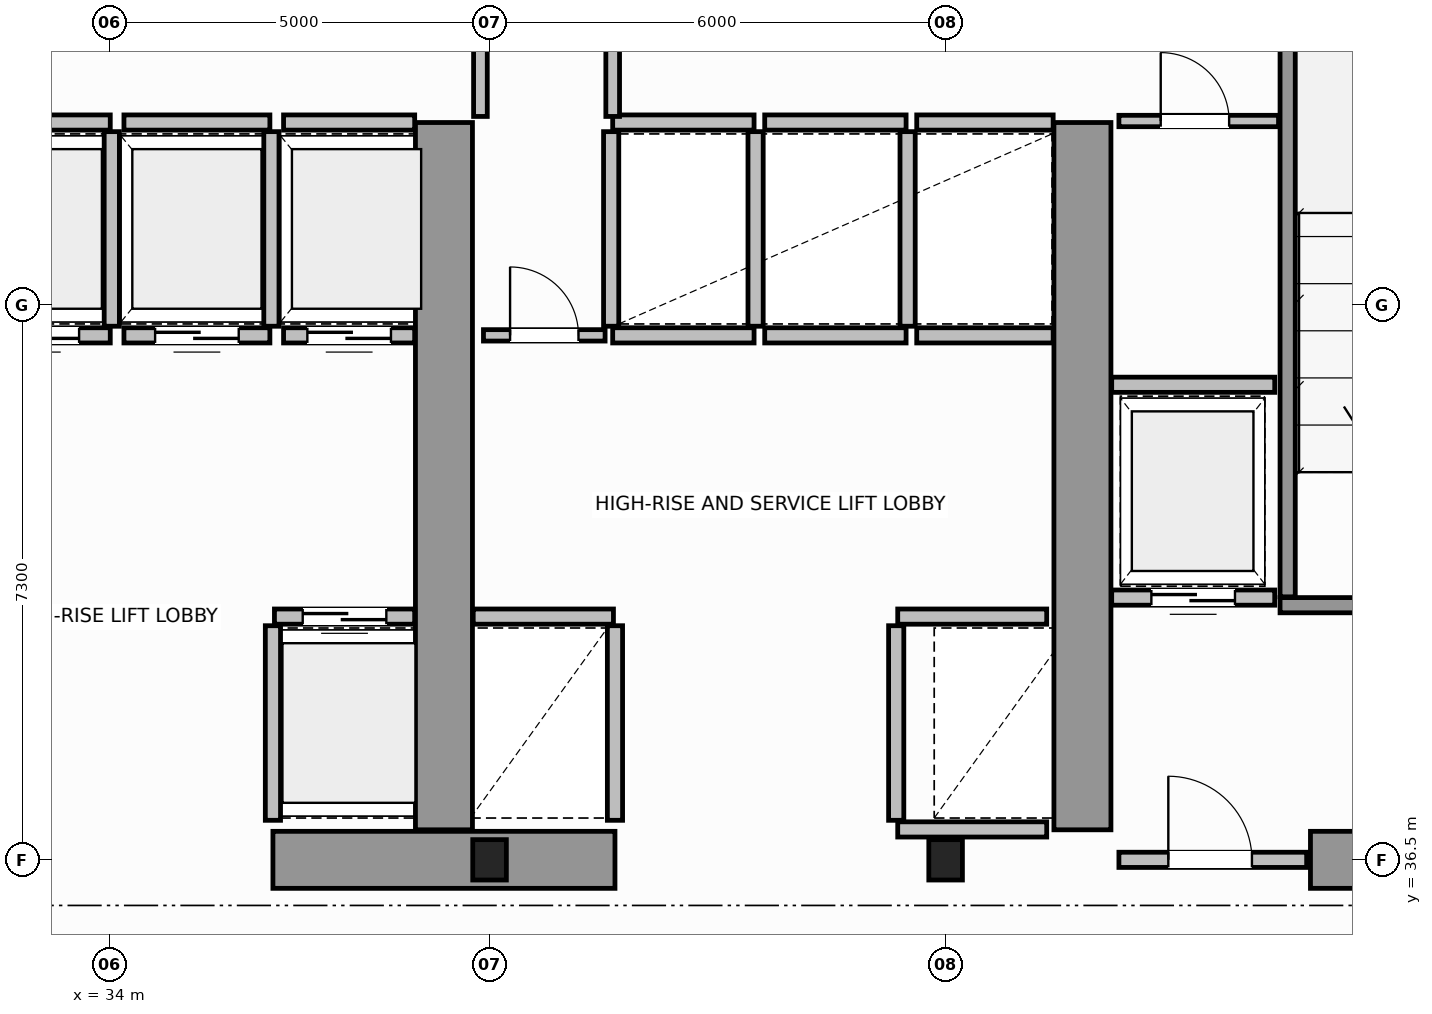
"""IFC4 building model, lengths in metres.
Left out: names, types, materials, properties, quantities, classifications, styles, units other than length and angle.
Written with IfcOpenShell. Run it as: python <this file> out.ifc"""

import sys

from ifc_helpers import new_model, si_unit, direction, frame, frame_2d, origin, origin_2d, place, context, subcontext, project, spatial, rectangle, i_section, extrude, source, transform, mapped, element, fill, save


model = new_model("IFC4")
c1 = context("Model", 3, precision=1e-05, world=origin(), true_north=direction((0.0, 1.0)))
c2 = subcontext(c1, "Body", "Model", "MODEL_VIEW")
j1 = project(units=[si_unit("LENGTHUNIT", "METRE"), si_unit("PLANEANGLEUNIT", "RADIAN")], contexts=[c1])
p1 = place(None, origin())
s1 = spatial("IfcSite", under=j1, at=p1, CompositionType="ELEMENT")
p2 = place(p1, origin())
s2 = spatial("IfcBuilding", under=s1, at=p2, CompositionType="ELEMENT")
p3 = place(p2, frame((0.0, 0.0, 107.2)))
s3 = spatial("IfcBuildingStorey", under=s2, at=p3, CompositionType="ELEMENT", Elevation=107.2)
m1 = source(origin(), c2, "Body", "SweptSolid", [
    extrude(i_section(OverallWidth=0.442, OverallDepth=0.531, WebThickness=0.065, FlangeThickness=0.076, FilletRadius=0.015, at=origin_2d()), origin(), (0.0, 0.0, 1.0), 3.8),
])
for number, where, z_axis, x_axis in (
    (1, (39.0, 36.5, 0.0), (0.0, 0.0, 1.0), (1.0, 0.0, 0.0)),
    (2, (45.0, 36.5, 0.0), (0.0, 0.0, 1.0), (1.0, 0.0, 0.0)),
):
    element("IfcColumn", number, at=place(p3, frame(where, z_axis=z_axis, x_axis=x_axis)), inside=s3, PredefinedType="COLUMN", context=c2, shape_type="MappedRepresentation", body=[
        mapped(m1, transform((0.0, 0.0, 0.0), scale=1.0)),
    ])
p4 = place(p3, frame((36.15, 36.5, 0.0), z_axis=(0.0, 0.0, 1.0), x_axis=(1.0, 0.0, 0.0)))
e3 = element("IfcWall", 3, at=p4, inside=s3, PredefinedType="SHEAR", context=c2, shape_type="SweptSolid", body=[
    extrude(rectangle(XDim=4.5, YDim=0.75, at=frame_2d((2.25, 0.0))), origin(), (0.0, 0.0, 1.0), 3.8),
])
p5 = place(p3, frame((49.8, 36.5, 0.0), z_axis=(0.0, 0.0, 1.0), x_axis=(1.0, 0.0, 0.0)))
e4 = element("IfcWall", 4, at=p5, inside=s3, PredefinedType="SHEAR", context=c2, shape_type="SweptSolid", body=[
    extrude(rectangle(XDim=3.805, YDim=0.75, at=frame_2d((1.902, 0.0))), origin(), (0.0, 0.0, 1.0), 2.38),
])
for number, where, z_axis, x_axis in (
    (5, (38.4, 36.895, 0.0), (0.0, 0.0, 1.0), (0.0, 1.0, 0.0)),
    (6, (46.8, 36.895, 0.0), (0.0, 0.0, 1.0), (0.0, 1.0, 0.0)),
):
    element("IfcWall", number, at=place(p3, frame(where, z_axis=z_axis, x_axis=x_axis)), inside=s3, PredefinedType="SHEAR", context=c2, shape_type="SweptSolid", body=[
        extrude(rectangle(XDim=9.305, YDim=0.75, at=frame_2d((4.652, 0.0))), origin(), (0.0, 0.0, 1.0), 3.8),
    ])
p6 = place(p3, frame((49.4, 39.85, 0.0), z_axis=(0.0, 0.0, 1.0), x_axis=(1.0, 0.0, 0.0)))
e7 = element("IfcWall", 7, at=p6, inside=s3, PredefinedType="SOLIDWALL", context=c2, shape_type="SweptSolid", body=[
    extrude(rectangle(XDim=4.225, YDim=0.2, at=frame_2d((2.113, 0.0))), origin(), (0.0, 0.0, 1.0), 3.8),
])
p7 = place(p6, frame((1.325, 0.0, 0.0)))
e8 = element("IfcOpeningElement", 8, at=p7, cuts=e7, PredefinedType="OPENING", context=c2, shape_type="SweptSolid", body=[
    extrude(rectangle(XDim=1.1, YDim=2.15, at=frame_2d((0.55, 1.075))), frame((0.0, 0.11, 0.0), z_axis=(0.0, -1.0, 0.0), x_axis=(1.0, 0.0, 0.0)), (0.0, 0.0, 1.0), 0.22),
])
p8 = place(p3, frame((49.5, 39.96, 0.0), z_axis=(0.0, 0.0, 1.0), x_axis=(0.0, 1.0, 0.0)))
e9 = element("IfcWall", 9, at=p8, inside=s3, PredefinedType="SOLIDWALL", context=c2, shape_type="SweptSolid", body=[
    extrude(rectangle(XDim=9.93, YDim=0.2, at=frame_2d((4.965, 0.0))), origin(), (0.0, 0.0, 1.0), 3.8),
])
p9 = place(p3, frame((47.28, 36.5, 0.0), z_axis=(0.0, 0.0, 1.0), x_axis=(1.0, 0.0, 0.0)))
e10 = element("IfcWall", 10, at=p9, inside=s3, PredefinedType="SOLIDWALL", context=c2, shape_type="SweptSolid", body=[
    extrude(rectangle(XDim=2.47, YDim=0.2, at=frame_2d((1.235, 0.0))), origin(), (0.0, 0.0, 1.0), 2.37),
])
p10 = place(p9, frame((0.65, 0.0, 0.0)))
e11 = element("IfcOpeningElement", 11, at=p10, cuts=e10, PredefinedType="OPENING", context=c2, shape_type="SweptSolid", body=[
    extrude(rectangle(XDim=1.1, YDim=2.15, at=frame_2d((0.55, 1.075))), frame((0.0, 0.11, 0.0), z_axis=(0.0, -1.0, 0.0), x_axis=(1.0, 0.0, 0.0)), (0.0, 0.0, 1.0), 0.22),
])
p11 = place(p3, frame((36.17, 39.7, 0.0), z_axis=(0.0, 0.0, 1.0), x_axis=(1.0, 0.0, 0.0)))
e12 = element("IfcWall", 12, at=p11, inside=s3, PredefinedType="SOLIDWALL", context=c2, shape_type="SweptSolid", body=[
    extrude(rectangle(XDim=1.845, YDim=0.2, at=frame_2d((0.922, 0.0))), origin(), (0.0, 0.0, 1.0), 3.58),
])
p12 = place(p11, frame((0.372, 0.0, 0.0)))
e13 = element("IfcOpeningElement", 13, at=p12, cuts=e12, PredefinedType="OPENING", context=c2, shape_type="SweptSolid", body=[
    extrude(rectangle(XDim=1.1, YDim=2.15, at=frame_2d((0.55, 1.075))), frame((0.0, 0.11, 0.0), z_axis=(0.0, -1.0, 0.0), x_axis=(1.0, 0.0, 0.0)), (0.0, 0.0, 1.0), 0.22),
])
p13 = place(p3, frame((36.15, 37.02, 0.0), z_axis=(0.0, 0.0, 1.0), x_axis=(0.0, 1.0, 0.0)))
e14 = element("IfcWall", 14, at=p13, inside=s3, PredefinedType="SOLIDWALL", context=c2, shape_type="SweptSolid", body=[
    extrude(rectangle(XDim=2.56, YDim=0.2, at=frame_2d((1.28, 0.0))), origin(), (0.0, 0.0, 1.0), 3.58),
])
p14 = place(p3, frame((32.09, 43.4, 0.0), z_axis=(0.0, 0.0, 1.0), x_axis=(1.0, 0.0, 0.0)))
e15 = element("IfcWall", 15, at=p14, inside=s3, PredefinedType="SOLIDWALL", context=c2, shape_type="SweptSolid", body=[
    extrude(rectangle(XDim=1.92, YDim=0.2, at=frame_2d((0.96, 0.0))), origin(), (0.0, 0.0, 1.0), 3.58),
])
p15 = place(p14, frame((0.41, 0.0, 0.0)))
e16 = element("IfcOpeningElement", 16, at=p15, cuts=e15, PredefinedType="OPENING", context=c2, shape_type="SweptSolid", body=[
    extrude(rectangle(XDim=1.1, YDim=2.15, at=frame_2d((0.55, 1.075))), frame((0.0, 0.11, 0.0), z_axis=(0.0, -1.0, 0.0), x_axis=(1.0, 0.0, 0.0)), (0.0, 0.0, 1.0), 0.22),
])
p16 = place(p3, frame((32.09, 46.2, 0.0), z_axis=(0.0, 0.0, 1.0), x_axis=(1.0, 0.0, 0.0)))
e17 = element("IfcWall", 17, at=p16, inside=s3, PredefinedType="SOLIDWALL", context=c2, shape_type="SweptSolid", body=[
    extrude(rectangle(XDim=1.92, YDim=0.2, at=frame_2d((0.96, 0.0))), origin(), (0.0, 0.0, 1.0), 3.58),
])
p17 = place(p3, frame((34.03, 43.52, 0.0), z_axis=(0.0, 0.0, 1.0), x_axis=(0.0, 1.0, 0.0)))
e18 = element("IfcWall", 18, at=p17, inside=s3, PredefinedType="SOLIDWALL", context=c2, shape_type="SweptSolid", body=[
    extrude(rectangle(XDim=2.56, YDim=0.2, at=frame_2d((1.28, 0.0))), origin(), (0.0, 0.0, 1.0), 3.58),
])
p18 = place(p3, frame((34.19, 43.4, 0.0), z_axis=(0.0, 0.0, 1.0), x_axis=(1.0, 0.0, 0.0)))
e19 = element("IfcWall", 19, at=p18, inside=s3, PredefinedType="SOLIDWALL", context=c2, shape_type="SweptSolid", body=[
    extrude(rectangle(XDim=1.92, YDim=0.2, at=frame_2d((0.96, 0.0))), origin(), (0.0, 0.0, 1.0), 3.58),
])
p19 = place(p18, frame((0.41, 0.0, 0.0)))
e20 = element("IfcOpeningElement", 20, at=p19, cuts=e19, PredefinedType="OPENING", context=c2, shape_type="SweptSolid", body=[
    extrude(rectangle(XDim=1.1, YDim=2.15, at=frame_2d((0.55, 1.075))), frame((0.0, 0.11, 0.0), z_axis=(0.0, -1.0, 0.0), x_axis=(1.0, 0.0, 0.0)), (0.0, 0.0, 1.0), 0.22),
])
p20 = place(p3, frame((34.19, 46.2, 0.0), z_axis=(0.0, 0.0, 1.0), x_axis=(1.0, 0.0, 0.0)))
e21 = element("IfcWall", 21, at=p20, inside=s3, PredefinedType="SOLIDWALL", context=c2, shape_type="SweptSolid", body=[
    extrude(rectangle(XDim=1.92, YDim=0.2, at=frame_2d((0.96, 0.0))), origin(), (0.0, 0.0, 1.0), 3.58),
])
p21 = place(p3, frame((36.13, 43.52, 0.0), z_axis=(0.0, 0.0, 1.0), x_axis=(0.0, 1.0, 0.0)))
e22 = element("IfcWall", 22, at=p21, inside=s3, PredefinedType="SOLIDWALL", context=c2, shape_type="SweptSolid", body=[
    extrude(rectangle(XDim=2.56, YDim=0.2, at=frame_2d((1.28, 0.0))), origin(), (0.0, 0.0, 1.0), 3.58),
])
p22 = place(p3, frame((36.29, 43.4, 0.0), z_axis=(0.0, 0.0, 1.0), x_axis=(1.0, 0.0, 0.0)))
e23 = element("IfcWall", 23, at=p22, inside=s3, PredefinedType="SOLIDWALL", context=c2, shape_type="SweptSolid", body=[
    extrude(rectangle(XDim=1.725, YDim=0.2, at=frame_2d((0.862, 0.0))), origin(), (0.0, 0.0, 1.0), 3.58),
])
p23 = place(p22, frame((0.313, 0.0, 0.0)))
e24 = element("IfcOpeningElement", 24, at=p23, cuts=e23, PredefinedType="OPENING", context=c2, shape_type="SweptSolid", body=[
    extrude(rectangle(XDim=1.1, YDim=2.15, at=frame_2d((0.55, 1.075))), frame((0.0, 0.11, 0.0), z_axis=(0.0, -1.0, 0.0), x_axis=(1.0, 0.0, 0.0)), (0.0, 0.0, 1.0), 0.22),
])
p24 = place(p3, frame((36.29, 46.2, 0.0), z_axis=(0.0, 0.0, 1.0), x_axis=(1.0, 0.0, 0.0)))
e25 = element("IfcWall", 25, at=p24, inside=s3, PredefinedType="SOLIDWALL", context=c2, shape_type="SweptSolid", body=[
    extrude(rectangle(XDim=1.725, YDim=0.2, at=frame_2d((0.862, 0.0))), origin(), (0.0, 0.0, 1.0), 3.58),
])
p25 = place(p3, frame((38.785, 39.7, 0.0), z_axis=(0.0, 0.0, 1.0), x_axis=(1.0, 0.0, 0.0)))
e26 = element("IfcWall", 26, at=p25, inside=s3, PredefinedType="SOLIDWALL", context=c2, shape_type="SweptSolid", body=[
    extrude(rectangle(XDim=1.845, YDim=0.2, at=frame_2d((0.922, 0.0))), origin(), (0.0, 0.0, 1.0), 3.58),
])
p26 = place(p3, frame((40.65, 37.02, 0.0), z_axis=(0.0, 0.0, 1.0), x_axis=(0.0, 1.0, 0.0)))
e27 = element("IfcWall", 27, at=p26, inside=s3, PredefinedType="SOLIDWALL", context=c2, shape_type="SweptSolid", body=[
    extrude(rectangle(XDim=2.56, YDim=0.2, at=frame_2d((1.28, 0.0))), origin(), (0.0, 0.0, 1.0), 3.58),
])
p27 = place(p3, frame((44.37, 39.7, 0.0), z_axis=(0.0, 0.0, 1.0), x_axis=(1.0, 0.0, 0.0)))
e28 = element("IfcWall", 28, at=p27, inside=s3, PredefinedType="SOLIDWALL", context=c2, shape_type="SweptSolid", body=[
    extrude(rectangle(XDim=1.96, YDim=0.2, at=frame_2d((0.98, 0.0))), origin(), (0.0, 0.0, 1.0), 3.58),
])
p28 = place(p3, frame((44.37, 36.9, 0.0), z_axis=(0.0, 0.0, 1.0), x_axis=(1.0, 0.0, 0.0)))
e29 = element("IfcWall", 29, at=p28, inside=s3, PredefinedType="SOLIDWALL", context=c2, shape_type="SweptSolid", body=[
    extrude(rectangle(XDim=1.96, YDim=0.2, at=frame_2d((0.98, 0.0))), origin(), (0.0, 0.0, 1.0), 2.37),
])
p29 = place(p3, frame((44.35, 37.02, 0.0), z_axis=(0.0, 0.0, 1.0), x_axis=(0.0, 1.0, 0.0)))
e30 = element("IfcWall", 30, at=p29, inside=s3, PredefinedType="SOLIDWALL", context=c2, shape_type="SweptSolid", body=[
    extrude(rectangle(XDim=2.56, YDim=0.2, at=frame_2d((1.28, 0.0))), origin(), (0.0, 0.0, 1.0), 3.58),
])
for number, where, z_axis, x_axis in (
    (31, (40.62, 43.4, 0.0), (0.0, 0.0, 1.0), (1.0, 0.0, 0.0)),
    (32, (40.62, 46.2, 0.0), (0.0, 0.0, 1.0), (1.0, 0.0, 0.0)),
):
    element("IfcWall", number, at=place(p3, frame(where, z_axis=z_axis, x_axis=x_axis)), inside=s3, PredefinedType="SOLIDWALL", context=c2, shape_type="SweptSolid", body=[
        extrude(rectangle(XDim=1.86, YDim=0.2, at=frame_2d((0.93, 0.0))), origin(), (0.0, 0.0, 1.0), 3.58),
    ])
for number, where, z_axis, x_axis in (
    (33, (40.6, 43.52, 0.0), (0.0, 0.0, 1.0), (0.0, 1.0, 0.0)),
    (34, (42.5, 43.52, 0.0), (0.0, 0.0, 1.0), (0.0, 1.0, 0.0)),
):
    element("IfcWall", number, at=place(p3, frame(where, z_axis=z_axis, x_axis=x_axis)), inside=s3, PredefinedType="SOLIDWALL", context=c2, shape_type="SweptSolid", body=[
        extrude(rectangle(XDim=2.56, YDim=0.2, at=frame_2d((1.28, 0.0))), origin(), (0.0, 0.0, 1.0), 3.58),
    ])
for number, where, z_axis, x_axis in (
    (35, (42.62, 43.4, 0.0), (0.0, 0.0, 1.0), (1.0, 0.0, 0.0)),
    (36, (42.62, 46.2, 0.0), (0.0, 0.0, 1.0), (1.0, 0.0, 0.0)),
):
    element("IfcWall", number, at=place(p3, frame(where, z_axis=z_axis, x_axis=x_axis)), inside=s3, PredefinedType="SOLIDWALL", context=c2, shape_type="SweptSolid", body=[
        extrude(rectangle(XDim=1.86, YDim=0.2, at=frame_2d((0.93, 0.0))), origin(), (0.0, 0.0, 1.0), 3.58),
    ])
p30 = place(p3, frame((44.5, 43.52, 0.0), z_axis=(0.0, 0.0, 1.0), x_axis=(0.0, 1.0, 0.0)))
e37 = element("IfcWall", 37, at=p30, inside=s3, PredefinedType="SOLIDWALL", context=c2, shape_type="SweptSolid", body=[
    extrude(rectangle(XDim=2.56, YDim=0.2, at=frame_2d((1.28, 0.0))), origin(), (0.0, 0.0, 1.0), 3.58),
])
for number, where, z_axis, x_axis in (
    (38, (44.62, 43.4, 0.0), (0.0, 0.0, 1.0), (1.0, 0.0, 0.0)),
    (39, (44.62, 46.2, 0.0), (0.0, 0.0, 1.0), (1.0, 0.0, 0.0)),
):
    element("IfcWall", number, at=place(p3, frame(where, z_axis=z_axis, x_axis=x_axis)), inside=s3, PredefinedType="SOLIDWALL", context=c2, shape_type="SweptSolid", body=[
        extrude(rectangle(XDim=1.795, YDim=0.2, at=frame_2d((0.897, 0.0))), origin(), (0.0, 0.0, 1.0), 3.58),
    ])
p31 = place(p3, frame((47.185, 39.95, 0.0), z_axis=(0.0, 0.0, 1.0), x_axis=(1.0, 0.0, 0.0)))
e40 = element("IfcWall", 40, at=p31, inside=s3, PredefinedType="SOLIDWALL", context=c2, shape_type="SweptSolid", body=[
    extrude(rectangle(XDim=2.145, YDim=0.2, at=frame_2d((1.073, 0.0))), origin(), (0.0, 0.0, 1.0), 3.58),
])
p32 = place(p31, frame((0.522, 0.0, 0.0)))
e41 = element("IfcOpeningElement", 41, at=p32, cuts=e40, PredefinedType="OPENING", context=c2, shape_type="SweptSolid", body=[
    extrude(rectangle(XDim=1.1, YDim=2.15, at=frame_2d((0.55, 1.075))), frame((0.0, 0.11, 0.0), z_axis=(0.0, -1.0, 0.0), x_axis=(1.0, 0.0, 0.0)), (0.0, 0.0, 1.0), 0.22),
])
p33 = place(p3, frame((47.185, 42.75, 0.0), z_axis=(0.0, 0.0, 1.0), x_axis=(1.0, 0.0, 0.0)))
e42 = element("IfcWall", 42, at=p33, inside=s3, PredefinedType="SOLIDWALL", context=c2, shape_type="SweptSolid", body=[
    extrude(rectangle(XDim=2.145, YDim=0.2, at=frame_2d((1.073, 0.0))), origin(), (0.0, 0.0, 1.0), 3.58),
])
p34 = place(p3, frame((47.28, 46.22, 0.0), z_axis=(0.0, 0.0, 1.0), x_axis=(1.0, 0.0, 0.0)))
e43 = element("IfcWall", 43, at=p34, inside=s3, PredefinedType="PARTITIONING", context=c2, shape_type="SweptSolid", body=[
    extrude(rectangle(XDim=2.1, YDim=0.15, at=frame_2d((1.05, 0.0))), origin(), (0.0, 0.0, 1.0), 3.58),
])
p35 = place(p34, frame((0.55, 0.0, 0.0)))
e44 = element("IfcOpeningElement", 44, at=p35, cuts=e43, PredefinedType="OPENING", context=c2, shape_type="SweptSolid", body=[
    extrude(rectangle(XDim=0.9, YDim=2.1, at=frame_2d((0.45, 1.05))), frame((0.0, 0.085, 0.0), z_axis=(0.0, -1.0, 0.0), x_axis=(1.0, 0.0, 0.0)), (0.0, 0.0, 1.0), 0.17),
])
p36 = place(p3, frame((38.92, 43.4, 0.0), z_axis=(0.0, 0.0, 1.0), x_axis=(1.0, 0.0, 0.0)))
e45 = element("IfcWall", 45, at=p36, inside=s3, PredefinedType="PARTITIONING", context=c2, shape_type="SweptSolid", body=[
    extrude(rectangle(XDim=1.6, YDim=0.15, at=frame_2d((0.8, 0.0))), origin(), (0.0, 0.0, 1.0), 3.58),
])
p37 = place(p36, frame((0.35, 0.0, 0.0)))
e46 = element("IfcOpeningElement", 46, at=p37, cuts=e45, PredefinedType="OPENING", context=c2, shape_type="SweptSolid", body=[
    extrude(rectangle(XDim=0.9, YDim=2.1, at=frame_2d((0.45, 1.05))), frame((0.0, 0.085, 0.0), z_axis=(0.0, -1.0, 0.0), x_axis=(1.0, 0.0, 0.0)), (0.0, 0.0, 1.0), 0.17),
])
p38 = place(p3, frame((38.88, 46.28, 0.0), z_axis=(0.0, 0.0, 1.0), x_axis=(0.0, 1.0, 0.0)))
e47 = element("IfcWall", 47, at=p38, inside=s3, PredefinedType="PLUMBINGWALL", context=c2, shape_type="SweptSolid", body=[
    extrude(rectangle(XDim=1.94, YDim=0.18, at=frame_2d((0.97, 0.0))), origin(), (0.0, 0.0, 1.0), 3.58),
])
p39 = place(p3, frame((40.62, 46.28, 0.0), z_axis=(0.0, 0.0, 1.0), x_axis=(0.0, 1.0, 0.0)))
e48 = element("IfcWall", 48, at=p39, inside=s3, PredefinedType="PLUMBINGWALL", context=c2, shape_type="SweptSolid", body=[
    extrude(rectangle(XDim=2.0, YDim=0.18, at=frame_2d((1.0, 0.0))), origin(), (0.0, 0.0, 1.0), 3.58),
])
m2 = source(origin(), c2, "Body", "SweptSolid", [
    extrude(rectangle(XDim=1.1, YDim=2.15, at=frame_2d((0.55, 1.075))), frame((0.0, 0.025, 0.0), z_axis=(0.0, -1.0, 0.0), x_axis=(1.0, 0.0, 0.0)), (0.0, 0.0, 1.0), 0.05),
])
p40 = place(p10, origin())
e49 = element("IfcDoor", 49, at=p40, inside=s3, OperationType="SINGLE_SWING_LEFT", PredefinedType="DOOR", context=c2, shape_type="MappedRepresentation", body=[
    mapped(m2, transform((0.0, 0.0, 0.0), scale=1.0)),
])
fill(e11, e49)
p41 = place(p12, origin())
e50 = element("IfcDoor", 50, at=p41, inside=s3, OperationType="DOUBLE_DOOR_SLIDING", PredefinedType="DOOR", context=c2, shape_type="MappedRepresentation", body=[
    mapped(m2, transform((0.0, 0.0, 0.0), scale=1.0)),
])
fill(e13, e50)
p42 = place(p15, origin())
e51 = element("IfcDoor", 51, at=p42, inside=s3, OperationType="DOUBLE_DOOR_SLIDING", PredefinedType="DOOR", context=c2, shape_type="MappedRepresentation", body=[
    mapped(m2, transform((0.0, 0.0, 0.0), scale=1.0)),
])
fill(e16, e51)
p43 = place(p19, origin())
e52 = element("IfcDoor", 52, at=p43, inside=s3, OperationType="DOUBLE_DOOR_SLIDING", PredefinedType="DOOR", context=c2, shape_type="MappedRepresentation", body=[
    mapped(m2, transform((0.0, 0.0, 0.0), scale=1.0)),
])
fill(e20, e52)
p44 = place(p23, origin())
e53 = element("IfcDoor", 53, at=p44, inside=s3, OperationType="DOUBLE_DOOR_SLIDING", PredefinedType="DOOR", context=c2, shape_type="MappedRepresentation", body=[
    mapped(m2, transform((0.0, 0.0, 0.0), scale=1.0)),
])
fill(e24, e53)
p45 = place(p32, origin())
e54 = element("IfcDoor", 54, at=p45, inside=s3, OperationType="DOUBLE_DOOR_SLIDING", PredefinedType="DOOR", context=c2, shape_type="MappedRepresentation", body=[
    mapped(m2, transform((0.0, 0.0, 0.0), scale=1.0)),
])
fill(e41, e54)
m3 = source(origin(), c2, "Body", "SweptSolid", [
    extrude(rectangle(XDim=0.9, YDim=2.1, at=frame_2d((0.45, 1.05))), frame((0.0, 0.025, 0.0), z_axis=(0.0, -1.0, 0.0), x_axis=(1.0, 0.0, 0.0)), (0.0, 0.0, 1.0), 0.05),
])
p46 = place(p35, origin())
e55 = element("IfcDoor", 55, at=p46, inside=s3, OperationType="SINGLE_SWING_RIGHT", PredefinedType="DOOR", context=c2, shape_type="MappedRepresentation", body=[
    mapped(m3, transform((0.0, 0.0, 0.0), scale=1.0)),
])
fill(e44, e55)
p47 = place(p37, origin())
e56 = element("IfcDoor", 56, at=p47, inside=s3, OperationType="SINGLE_SWING_LEFT", PredefinedType="DOOR", context=c2, shape_type="MappedRepresentation", body=[
    mapped(m3, transform((0.0, 0.0, 0.0), scale=1.0)),
])
fill(e46, e56)
save(model, sys.argv[1])
